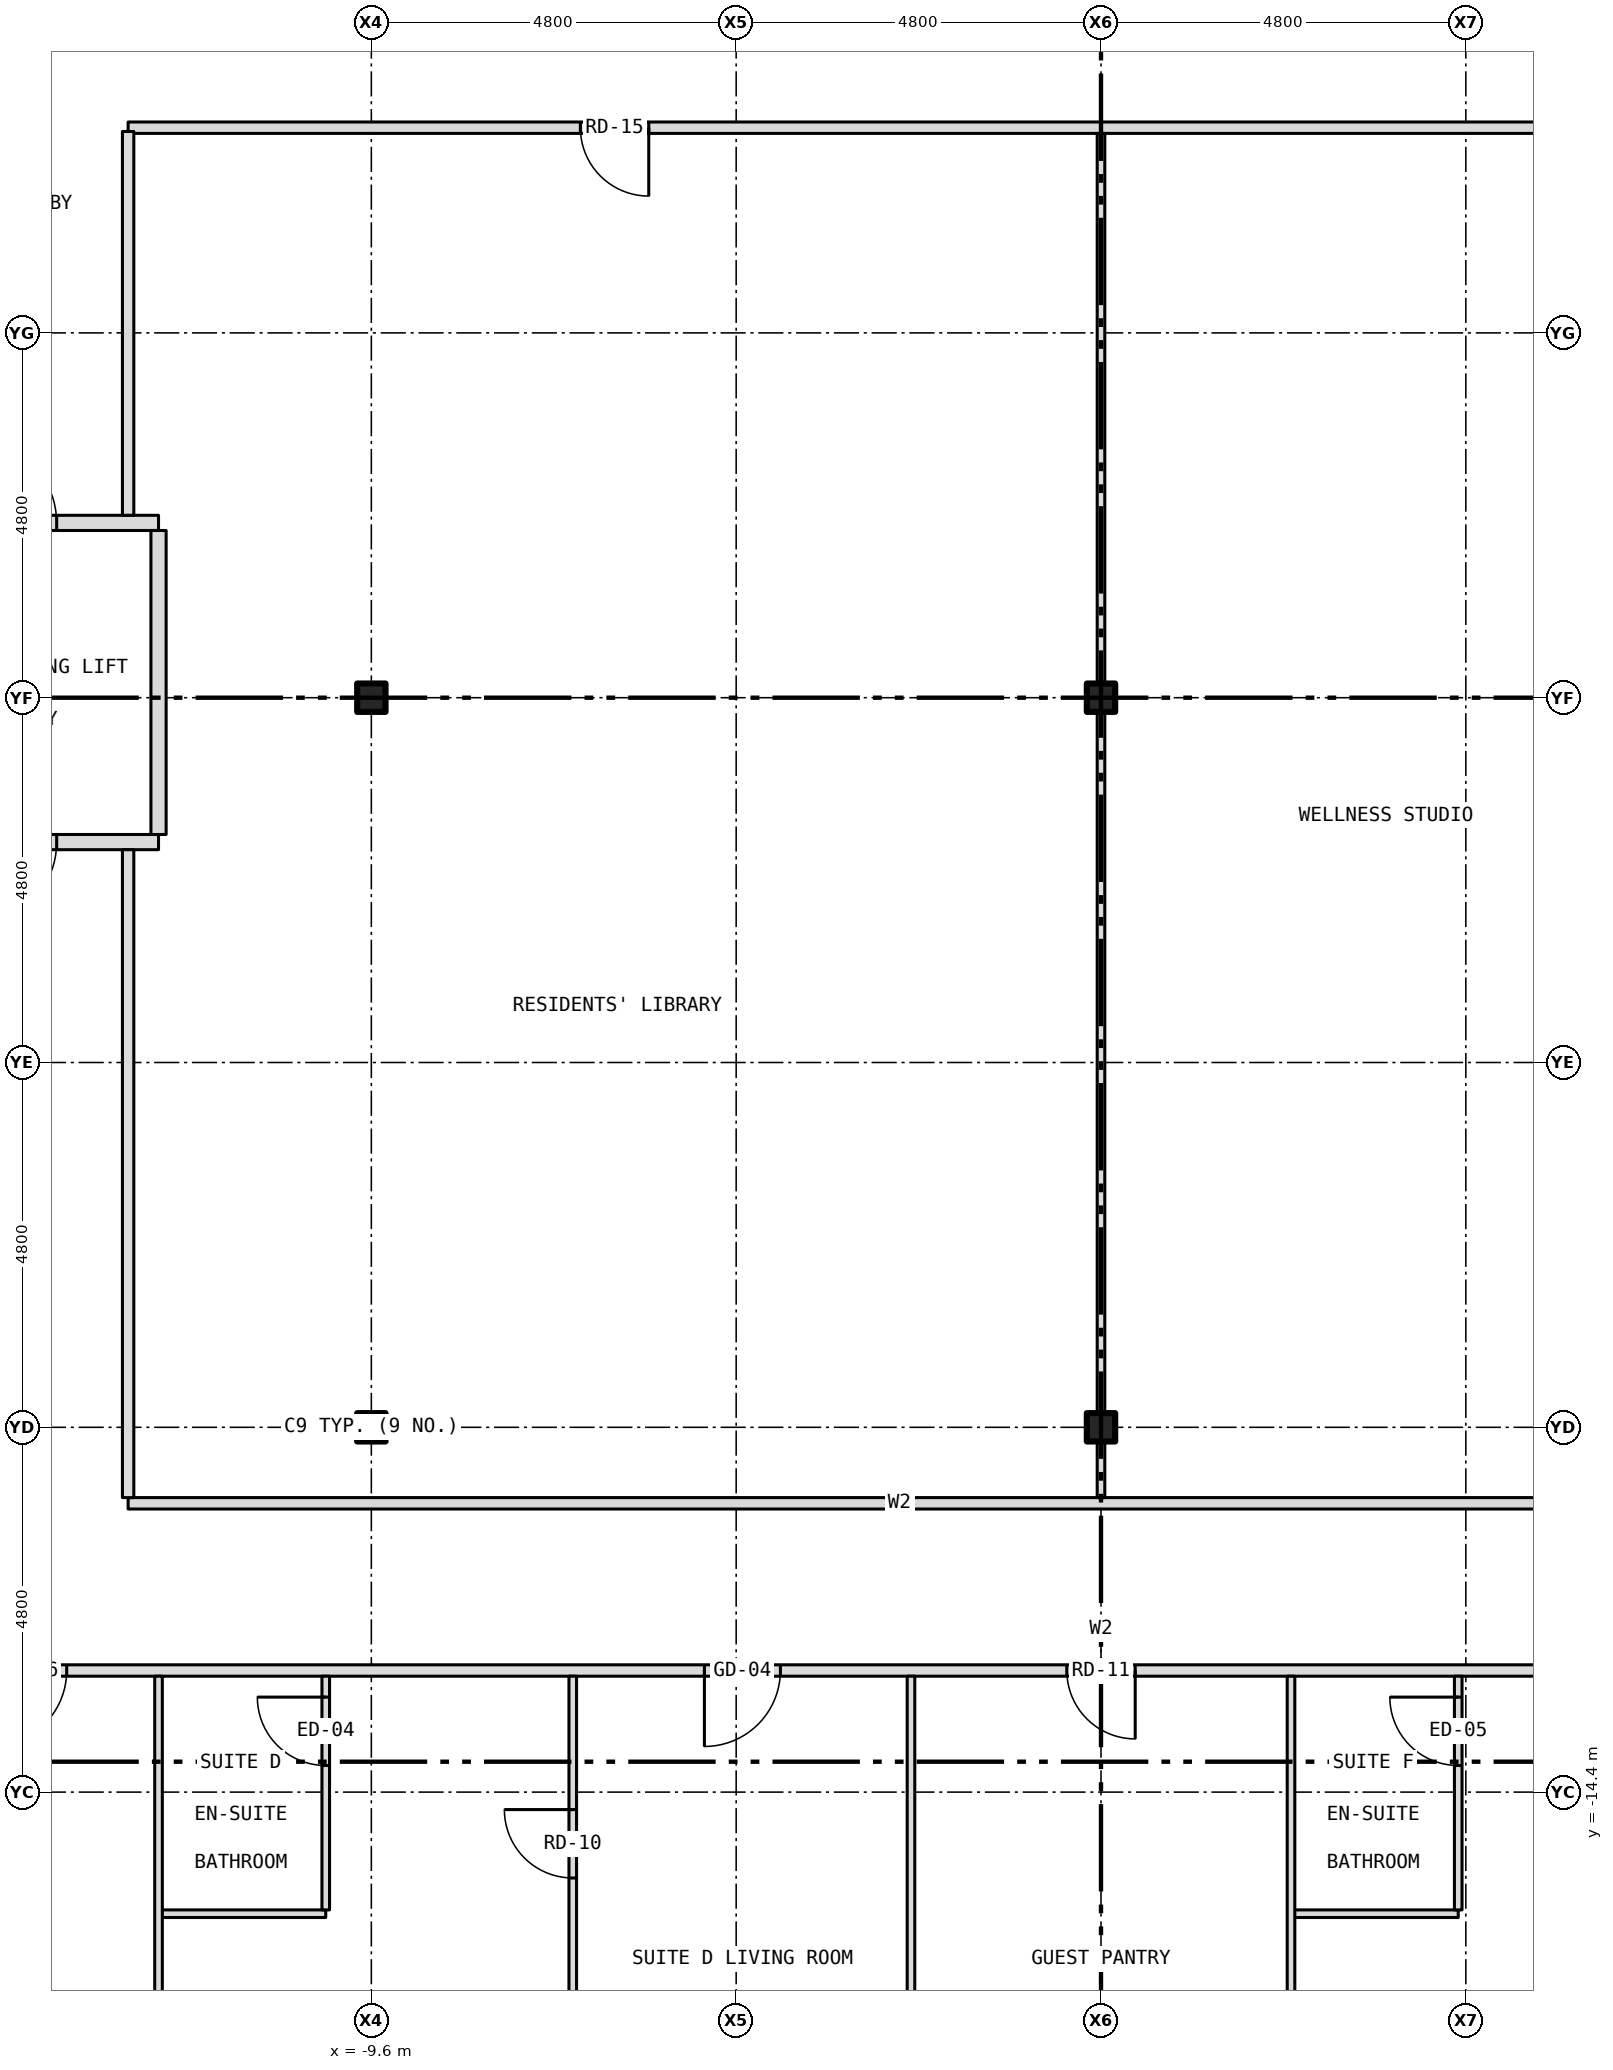
"""IFC4 building model, lengths in metres.
Left out: names, types, materials, properties, quantities, classifications, styles, units other than length and angle.
Written with IfcOpenShell. Run it as: python <this file> out.ifc"""

import sys

from ifc_helpers import new_model, si_unit, direction, frame, frame_2d, origin, origin_2d, place, context, subcontext, project, spatial, rectangle, i_section, extrude, element, fill, save


model = new_model("IFC4")
c1 = context("Model", 3, precision=1e-05, world=origin(), true_north=direction((0.0, 1.0)))
c2 = subcontext(c1, "Body", "Model", "MODEL_VIEW")
j1 = project(units=[si_unit("LENGTHUNIT", "METRE"), si_unit("PLANEANGLEUNIT", "RADIAN")], contexts=[c1])
p1 = place(None, origin())
s1 = spatial("IfcSite", under=j1, at=p1, CompositionType="ELEMENT")
p2 = place(p1, origin())
s2 = spatial("IfcBuilding", under=s1, at=p2, CompositionType="ELEMENT")
p3 = place(p2, frame((0.0, 0.0, 191.0)))
s3 = spatial("IfcBuildingStorey", under=s2, at=p3, CompositionType="ELEMENT", Elevation=191.0)
for number, where, z_axis, x_axis in (
    (1, (-9.6, -9.6, -0.15), (0.0, 0.0, 1.0), (1.0, 0.0, 0.0)),
    (2, (-9.6, 0.0, -0.15), (0.0, 0.0, 1.0), (1.0, 0.0, 0.0)),
    (3, (0.0, -9.6, -0.15), (0.0, 0.0, 1.0), (1.0, 0.0, 0.0)),
    (4, (0.0, 0.0, -0.15), (0.0, 0.0, 1.0), (1.0, 0.0, 0.0)),
):
    element("IfcColumn", number, at=place(p3, frame(where, z_axis=z_axis, x_axis=x_axis)), inside=s3, PredefinedType="COLUMN", context=c2, shape_type="SweptSolid", body=[
        extrude(i_section(OverallWidth=0.373, OverallDepth=0.373, WebThickness=0.016, FlangeThickness=0.026, at=origin_2d()), origin(), (0.0, 0.0, 1.0), 3.5),
    ])
for number, where, z_axis, x_axis in (
    (5, (-12.4, -16.0, 0.0), (0.0, 0.0, 1.0), (1.0, 0.0, 0.0)),
    (6, (2.5, -16.0, 0.0), (0.0, 0.0, 1.0), (1.0, 0.0, 0.0)),
):
    element("IfcWall", number, at=place(p3, frame(where, z_axis=z_axis, x_axis=x_axis)), inside=s3, PredefinedType="PARTITIONING", context=c2, shape_type="SweptSolid", body=[
        extrude(rectangle(XDim=2.2, YDim=0.1, at=frame_2d((1.1, 0.0))), origin(), (0.0, 0.0, 1.0), 3.35),
    ])
p4 = place(p3, frame((-15.8, -12.8, 0.0), z_axis=(0.0, 0.0, 1.0), x_axis=(1.0, 0.0, 0.0)))
e7 = element("IfcWall", 7, at=p4, inside=s3, PredefinedType="PARTITIONING", context=c2, shape_type="SweptSolid", body=[
    extrude(rectangle(XDim=31.6, YDim=0.15, at=frame_2d((15.8, 0.0))), origin(), (0.0, 0.0, 1.0), 3.35),
])
p5 = place(p4, frame((10.582, 0.0, 0.0)))
e8 = element("IfcOpeningElement", 8, at=p5, cuts=e7, PredefinedType="OPENING", context=c2, shape_type="SweptSolid", body=[
    extrude(rectangle(XDim=1.0, YDim=2.1, at=frame_2d((0.5, 1.05))), frame((0.0, 0.087, 0.0), z_axis=(0.0, -1.0, 0.0), x_axis=(1.0, 0.0, 0.0)), (0.0, 0.0, 1.0), 0.174),
])
p6 = place(p4, frame((15.35, 0.0, 0.0)))
e9 = element("IfcOpeningElement", 9, at=p6, cuts=e7, PredefinedType="OPENING", context=c2, shape_type="SweptSolid", body=[
    extrude(rectangle(XDim=0.9, YDim=2.1, at=frame_2d((0.45, 1.05))), frame((0.0, 0.087, 0.0), z_axis=(0.0, -1.0, 0.0), x_axis=(1.0, 0.0, 0.0)), (0.0, 0.0, 1.0), 0.174),
])
p7 = place(p4, frame((25.482, 0.0, 0.0)))
e10 = element("IfcOpeningElement", 10, at=p7, cuts=e7, PredefinedType="OPENING", context=c2, shape_type="SweptSolid", body=[
    extrude(rectangle(XDim=1.0, YDim=2.1, at=frame_2d((0.5, 1.05))), frame((0.0, 0.087, 0.0), z_axis=(0.0, -1.0, 0.0), x_axis=(1.0, 0.0, 0.0)), (0.0, 0.0, 1.0), 0.174),
])
p8 = place(p4, frame((1.192, 0.0, 0.0)))
e11 = element("IfcOpeningElement", 11, at=p8, cuts=e7, PredefinedType="OPENING", context=c2, shape_type="SweptSolid", body=[
    extrude(rectangle(XDim=1.0, YDim=2.1, at=frame_2d((0.5, 1.05))), frame((0.0, 0.087, 0.0), z_axis=(0.0, -1.0, 0.0), x_axis=(1.0, 0.0, 0.0)), (0.0, 0.0, 1.0), 0.174),
])
p9 = place(p4, frame((29.409, 0.0, 0.0)))
e12 = element("IfcOpeningElement", 12, at=p9, cuts=e7, PredefinedType="OPENING", context=c2, shape_type="SweptSolid", body=[
    extrude(rectangle(XDim=1.0, YDim=2.1, at=frame_2d((0.5, 1.05))), frame((0.0, 0.087, 0.0), z_axis=(0.0, -1.0, 0.0), x_axis=(1.0, 0.0, 0.0)), (0.0, 0.0, 1.0), 0.174),
])
p10 = place(p3, frame((-12.8, -10.6, 0.0), z_axis=(0.0, 0.0, 1.0), x_axis=(1.0, 0.0, 0.0)))
e13 = element("IfcWall", 13, at=p10, inside=s3, PredefinedType="PARTITIONING", context=c2, shape_type="SweptSolid", body=[
    extrude(rectangle(XDim=20.3, YDim=0.15, at=frame_2d((10.15, 0.0))), origin(), (0.0, 0.0, 1.0), 3.35),
])
p11 = place(p3, frame((-15.68, -1.9, 0.0), z_axis=(0.0, 0.0, 1.0), x_axis=(1.0, 0.0, 0.0)))
e14 = element("IfcWall", 14, at=p11, inside=s3, PredefinedType="PARTITIONING", context=c2, shape_type="SweptSolid", body=[
    extrude(rectangle(XDim=3.28, YDim=0.2, at=frame_2d((1.64, 0.0))), origin(), (0.0, 0.0, 1.0), 3.35),
])
p12 = place(p11, frame((0.84, 0.0, 0.0)))
e15 = element("IfcOpeningElement", 15, at=p12, cuts=e14, PredefinedType="OPENING", context=c2, shape_type="SweptSolid", body=[
    extrude(rectangle(XDim=1.1, YDim=2.1, at=frame_2d((0.55, 1.05))), frame((0.0, 0.112, 0.0), z_axis=(0.0, -1.0, 0.0), x_axis=(1.0, 0.0, 0.0)), (0.0, 0.0, 1.0), 0.224),
])
p13 = place(p3, frame((-15.68, 2.3, 0.0), z_axis=(0.0, 0.0, 1.0), x_axis=(1.0, 0.0, 0.0)))
e16 = element("IfcWall", 16, at=p13, inside=s3, PredefinedType="PARTITIONING", context=c2, shape_type="SweptSolid", body=[
    extrude(rectangle(XDim=3.28, YDim=0.2, at=frame_2d((1.64, 0.0))), origin(), (0.0, 0.0, 1.0), 3.35),
])
p14 = place(p13, frame((0.84, 0.0, 0.0)))
e17 = element("IfcOpeningElement", 17, at=p14, cuts=e16, PredefinedType="OPENING", context=c2, shape_type="SweptSolid", body=[
    extrude(rectangle(XDim=1.1, YDim=2.1, at=frame_2d((0.55, 1.05))), frame((0.0, 0.112, 0.0), z_axis=(0.0, -1.0, 0.0), x_axis=(1.0, 0.0, 0.0)), (0.0, 0.0, 1.0), 0.224),
])
p15 = place(p3, frame((-12.8, 7.5, 0.0), z_axis=(0.0, 0.0, 1.0), x_axis=(1.0, 0.0, 0.0)))
e18 = element("IfcWall", 18, at=p15, inside=s3, PredefinedType="PARTITIONING", context=c2, shape_type="SweptSolid", body=[
    extrude(rectangle(XDim=20.3, YDim=0.15, at=frame_2d((10.15, 0.0))), origin(), (0.0, 0.0, 1.0), 3.35),
])
p16 = place(p15, frame((5.95, 0.0, 0.0)))
e19 = element("IfcOpeningElement", 19, at=p16, cuts=e18, PredefinedType="OPENING", context=c2, shape_type="SweptSolid", body=[
    extrude(rectangle(XDim=0.9, YDim=2.1, at=frame_2d((0.45, 1.05))), frame((0.0, 0.087, 0.0), z_axis=(0.0, -1.0, 0.0), x_axis=(1.0, 0.0, 0.0)), (0.0, 0.0, 1.0), 0.174),
])
p17 = place(p3, frame((-12.8, -10.525, 0.0), z_axis=(0.0, 0.0, 1.0), x_axis=(0.0, 1.0, 0.0)))
e20 = element("IfcWall", 20, at=p17, inside=s3, PredefinedType="PARTITIONING", context=c2, shape_type="SweptSolid", body=[
    extrude(rectangle(XDim=8.525, YDim=0.15, at=frame_2d((4.262, 0.0))), origin(), (0.0, 0.0, 1.0), 3.35),
])
p18 = place(p3, frame((-12.8, 2.4, 0.0), z_axis=(0.0, 0.0, 1.0), x_axis=(0.0, 1.0, 0.0)))
e21 = element("IfcWall", 21, at=p18, inside=s3, PredefinedType="PARTITIONING", context=c2, shape_type="SweptSolid", body=[
    extrude(rectangle(XDim=5.05, YDim=0.15, at=frame_2d((2.525, 0.0))), origin(), (0.0, 0.0, 1.0), 3.35),
])
p19 = place(p3, frame((-12.4, -20.78, 0.0), z_axis=(0.0, 0.0, 1.0), x_axis=(0.0, 1.0, 0.0)))
e22 = element("IfcWall", 22, at=p19, inside=s3, PredefinedType="PARTITIONING", context=c2, shape_type="SweptSolid", body=[
    extrude(rectangle(XDim=7.905, YDim=0.1, at=frame_2d((3.953, 0.0))), origin(), (0.0, 0.0, 1.0), 3.35),
])
p20 = place(p3, frame((-12.4, -1.8, 0.0), z_axis=(0.0, 0.0, 1.0), x_axis=(0.0, 1.0, 0.0)))
e23 = element("IfcWall", 23, at=p20, inside=s3, PredefinedType="PARTITIONING", context=c2, shape_type="SweptSolid", body=[
    extrude(rectangle(XDim=4.0, YDim=0.2, at=frame_2d((2.0, 0.0))), origin(), (0.0, 0.0, 1.0), 3.35),
])
p21 = place(p3, frame((-10.2, -15.95, 0.0), z_axis=(0.0, 0.0, 1.0), x_axis=(0.0, 1.0, 0.0)))
e24 = element("IfcWall", 24, at=p21, inside=s3, PredefinedType="PARTITIONING", context=c2, shape_type="SweptSolid", body=[
    extrude(rectangle(XDim=3.075, YDim=0.1, at=frame_2d((1.538, 0.0))), origin(), (0.0, 0.0, 1.0), 3.35),
])
p22 = place(p21, frame((1.9, 0.0, 0.0)))
e25 = element("IfcOpeningElement", 25, at=p22, cuts=e24, PredefinedType="OPENING", context=c2, shape_type="SweptSolid", body=[
    extrude(rectangle(XDim=0.9, YDim=2.1, at=frame_2d((0.45, 1.05))), frame((0.0, 0.062, 0.0), z_axis=(0.0, -1.0, 0.0), x_axis=(1.0, 0.0, 0.0)), (0.0, 0.0, 1.0), 0.124),
])
p23 = place(p3, frame((-6.95, -20.78, 0.0), z_axis=(0.0, 0.0, 1.0), x_axis=(0.0, 1.0, 0.0)))
e26 = element("IfcWall", 26, at=p23, inside=s3, PredefinedType="PARTITIONING", context=c2, shape_type="SweptSolid", body=[
    extrude(rectangle(XDim=7.905, YDim=0.1, at=frame_2d((3.953, 0.0))), origin(), (0.0, 0.0, 1.0), 3.35),
])
p24 = place(p23, frame((5.25, 0.0, 0.0)))
e27 = element("IfcOpeningElement", 27, at=p24, cuts=e26, PredefinedType="OPENING", context=c2, shape_type="SweptSolid", body=[
    extrude(rectangle(XDim=0.9, YDim=2.1, at=frame_2d((0.45, 1.05))), frame((0.0, 0.062, 0.0), z_axis=(0.0, -1.0, 0.0), x_axis=(1.0, 0.0, 0.0)), (0.0, 0.0, 1.0), 0.124),
])
p25 = place(p3, frame((-2.5, -20.78, 0.0), z_axis=(0.0, 0.0, 1.0), x_axis=(0.0, 1.0, 0.0)))
e28 = element("IfcWall", 28, at=p25, inside=s3, PredefinedType="PARTITIONING", context=c2, shape_type="SweptSolid", body=[
    extrude(rectangle(XDim=7.905, YDim=0.1, at=frame_2d((3.953, 0.0))), origin(), (0.0, 0.0, 1.0), 3.35),
])
p26 = place(p3, frame((0.0, -10.525, 0.0), z_axis=(0.0, 0.0, 1.0), x_axis=(0.0, 1.0, 0.0)))
e29 = element("IfcWall", 29, at=p26, inside=s3, PredefinedType="PARTITIONING", context=c2, shape_type="SweptSolid", body=[
    extrude(rectangle(XDim=0.738, YDim=0.1, at=frame_2d((0.369, 0.0))), origin(), (0.0, 0.0, 1.0), 2.728),
])
p27 = place(p3, frame((0.0, -9.787, 0.0), z_axis=(0.0, 0.0, 1.0), x_axis=(0.0, 1.0, 0.0)))
e30 = element("IfcWall", 30, at=p27, inside=s3, PredefinedType="PARTITIONING", context=c2, shape_type="SweptSolid", body=[
    extrude(rectangle(XDim=0.374, YDim=0.1, at=frame_2d((0.187, 0.0))), origin(), (0.0, 0.0, 1.0), 3.35),
])
p28 = place(p3, frame((0.0, -9.413, 0.0), z_axis=(0.0, 0.0, 1.0), x_axis=(0.0, 1.0, 0.0)))
e31 = element("IfcWall", 31, at=p28, inside=s3, PredefinedType="PARTITIONING", context=c2, shape_type="SweptSolid", body=[
    extrude(rectangle(XDim=9.226, YDim=0.1, at=frame_2d((4.613, 0.0))), origin(), (0.0, 0.0, 1.0), 2.728),
])
p29 = place(p3, frame((0.0, -0.187, 0.0), z_axis=(0.0, 0.0, 1.0), x_axis=(0.0, 1.0, 0.0)))
e32 = element("IfcWall", 32, at=p29, inside=s3, PredefinedType="PARTITIONING", context=c2, shape_type="SweptSolid", body=[
    extrude(rectangle(XDim=0.374, YDim=0.1, at=frame_2d((0.187, 0.0))), origin(), (0.0, 0.0, 1.0), 3.35),
])
p30 = place(p3, frame((0.0, 0.187, 0.0), z_axis=(0.0, 0.0, 1.0), x_axis=(0.0, 1.0, 0.0)))
e33 = element("IfcWall", 33, at=p30, inside=s3, PredefinedType="PARTITIONING", context=c2, shape_type="SweptSolid", body=[
    extrude(rectangle(XDim=7.238, YDim=0.1, at=frame_2d((3.619, 0.0))), origin(), (0.0, 0.0, 1.0), 2.728),
])
p31 = place(p3, frame((2.5, -20.78, 0.0), z_axis=(0.0, 0.0, 1.0), x_axis=(0.0, 1.0, 0.0)))
e34 = element("IfcWall", 34, at=p31, inside=s3, PredefinedType="PARTITIONING", context=c2, shape_type="SweptSolid", body=[
    extrude(rectangle(XDim=7.905, YDim=0.1, at=frame_2d((3.953, 0.0))), origin(), (0.0, 0.0, 1.0), 3.35),
])
p32 = place(p3, frame((4.7, -15.95, 0.0), z_axis=(0.0, 0.0, 1.0), x_axis=(0.0, 1.0, 0.0)))
e35 = element("IfcWall", 35, at=p32, inside=s3, PredefinedType="PARTITIONING", context=c2, shape_type="SweptSolid", body=[
    extrude(rectangle(XDim=3.075, YDim=0.1, at=frame_2d((1.538, 0.0))), origin(), (0.0, 0.0, 1.0), 2.817),
])
p33 = place(p32, frame((1.9, 0.0, 0.0)))
e36 = element("IfcOpeningElement", 36, at=p33, cuts=e35, PredefinedType="OPENING", context=c2, shape_type="SweptSolid", body=[
    extrude(rectangle(XDim=0.9, YDim=2.1, at=frame_2d((0.45, 1.05))), frame((0.0, 0.062, 0.0), z_axis=(0.0, -1.0, 0.0), x_axis=(1.0, 0.0, 0.0)), (0.0, 0.0, 1.0), 0.124),
])
p34 = place(p14, origin())
e37 = element("IfcDoor", 37, at=p34, inside=s3, OperationType="SINGLE_SWING_LEFT", PredefinedType="DOOR", context=c2, shape_type="SweptSolid", body=[
    extrude(rectangle(XDim=1.1, YDim=2.1, at=frame_2d((0.55, 1.05))), frame((0.0, 0.025, 0.0), z_axis=(0.0, -1.0, 0.0), x_axis=(1.0, 0.0, 0.0)), (0.0, 0.0, 1.0), 0.05),
])
fill(e17, e37)
p35 = place(p12, origin())
e38 = element("IfcDoor", 38, at=p35, inside=s3, OperationType="SINGLE_SWING_LEFT", PredefinedType="DOOR", context=c2, shape_type="SweptSolid", body=[
    extrude(rectangle(XDim=1.1, YDim=2.1, at=frame_2d((0.55, 1.05))), frame((0.0, 0.025, 0.0), z_axis=(0.0, -1.0, 0.0), x_axis=(1.0, 0.0, 0.0)), (0.0, 0.0, 1.0), 0.05),
])
fill(e15, e38)
p36 = place(p5, origin())
e39 = element("IfcDoor", 39, at=p36, inside=s3, OperationType="SINGLE_SWING_LEFT", PredefinedType="DOOR", context=c2, shape_type="SweptSolid", body=[
    extrude(rectangle(XDim=1.0, YDim=2.1, at=frame_2d((0.5, 1.05))), frame((0.0, 0.025, 0.0), z_axis=(0.0, -1.0, 0.0), x_axis=(1.0, 0.0, 0.0)), (0.0, 0.0, 1.0), 0.05),
])
fill(e8, e39)
p37 = place(p24, origin())
e40 = element("IfcDoor", 40, at=p37, inside=s3, OperationType="SINGLE_SWING_RIGHT", PredefinedType="DOOR", context=c2, shape_type="SweptSolid", body=[
    extrude(rectangle(XDim=0.9, YDim=2.1, at=frame_2d((0.45, 1.05))), frame((0.0, 0.025, 0.0), z_axis=(0.0, -1.0, 0.0), x_axis=(1.0, 0.0, 0.0)), (0.0, 0.0, 1.0), 0.05),
])
fill(e27, e40)
p38 = place(p22, origin())
e41 = element("IfcDoor", 41, at=p38, inside=s3, OperationType="SINGLE_SWING_RIGHT", PredefinedType="DOOR", context=c2, shape_type="SweptSolid", body=[
    extrude(rectangle(XDim=0.9, YDim=2.1, at=frame_2d((0.45, 1.05))), frame((0.0, 0.025, 0.0), z_axis=(0.0, -1.0, 0.0), x_axis=(1.0, 0.0, 0.0)), (0.0, 0.0, 1.0), 0.05),
])
fill(e25, e41)
p39 = place(p6, origin())
e42 = element("IfcDoor", 42, at=p39, inside=s3, OperationType="SINGLE_SWING_RIGHT", PredefinedType="DOOR", context=c2, shape_type="SweptSolid", body=[
    extrude(rectangle(XDim=0.9, YDim=2.1, at=frame_2d((0.45, 1.05))), frame((0.0, 0.025, 0.0), z_axis=(0.0, -1.0, 0.0), x_axis=(1.0, 0.0, 0.0)), (0.0, 0.0, 1.0), 0.05),
])
fill(e9, e42)
p40 = place(p33, origin())
e43 = element("IfcDoor", 43, at=p40, inside=s3, OperationType="SINGLE_SWING_RIGHT", PredefinedType="DOOR", context=c2, shape_type="SweptSolid", body=[
    extrude(rectangle(XDim=0.9, YDim=2.1, at=frame_2d((0.45, 1.05))), frame((0.0, 0.025, 0.0), z_axis=(0.0, -1.0, 0.0), x_axis=(1.0, 0.0, 0.0)), (0.0, 0.0, 1.0), 0.05),
])
fill(e36, e43)
p41 = place(p8, origin())
e44 = element("IfcDoor", 44, at=p41, inside=s3, OperationType="SINGLE_SWING_LEFT", PredefinedType="DOOR", context=c2, shape_type="SweptSolid", body=[
    extrude(rectangle(XDim=1.0, YDim=2.1, at=frame_2d((0.5, 1.05))), frame((0.0, 0.025, 0.0), z_axis=(0.0, -1.0, 0.0), x_axis=(1.0, 0.0, 0.0)), (0.0, 0.0, 1.0), 0.05),
])
fill(e11, e44)
p42 = place(p16, origin())
e45 = element("IfcDoor", 45, at=p42, inside=s3, OperationType="SINGLE_SWING_RIGHT", PredefinedType="DOOR", context=c2, shape_type="SweptSolid", body=[
    extrude(rectangle(XDim=0.9, YDim=2.1, at=frame_2d((0.45, 1.05))), frame((0.0, 0.025, 0.0), z_axis=(0.0, -1.0, 0.0), x_axis=(1.0, 0.0, 0.0)), (0.0, 0.0, 1.0), 0.05),
])
fill(e19, e45)
save(model, sys.argv[1])
